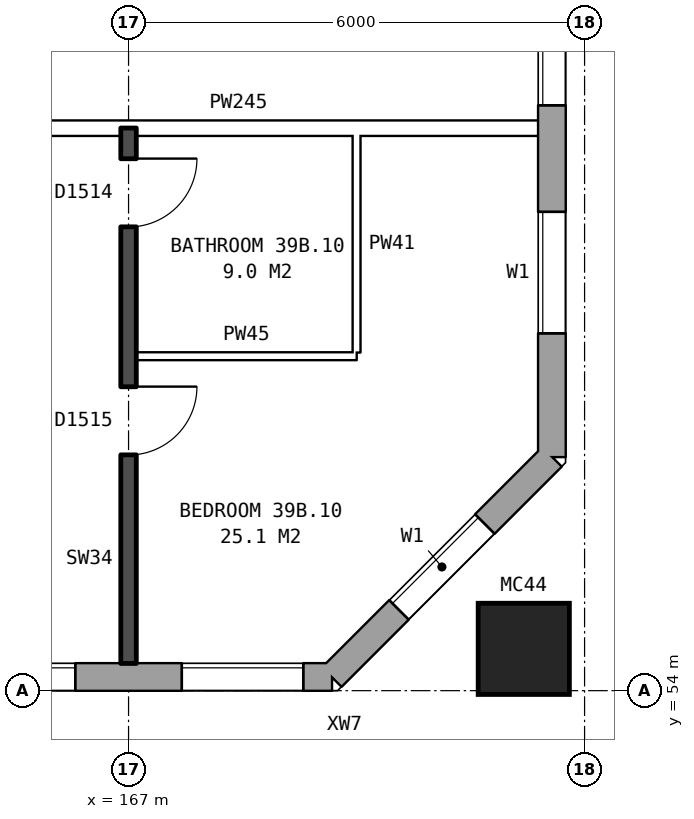
"""IFC4 building model, lengths in metres.
Left out: names, types, materials, properties, quantities, classifications, styles, units other than length and angle.
Written with IfcOpenShell. Run it as: python <this file> out.ifc"""

import sys

from ifc_helpers import new_model, si_unit, direction, frame, frame_2d, origin, origin_2d, place, context, subcontext, project, spatial, rectangle, hollow_rectangle, extrude, element, fill, save


model = new_model("IFC4")
c1 = context("Model", 3, precision=1e-05, world=origin(), true_north=direction((0.0, 1.0)))
c2 = subcontext(c1, "Body", "Model", "MODEL_VIEW")
j1 = project(units=[si_unit("LENGTHUNIT", "METRE"), si_unit("PLANEANGLEUNIT", "RADIAN")], contexts=[c1])
p1 = place(None, origin())
s1 = spatial("IfcSite", under=j1, at=p1, CompositionType="ELEMENT")
p2 = place(p1, origin())
s2 = spatial("IfcBuilding", under=s1, at=p2, CompositionType="ELEMENT")
p3 = place(p2, frame((0.0, 0.0, 139.2)))
s3 = spatial("IfcBuildingStorey", under=s2, at=p3, CompositionType="ELEMENT", Elevation=139.2)
p4 = place(p3, frame((172.2, 54.55, 0.0), z_axis=(0.0, 0.0, 1.0), x_axis=(1.0, 0.0, 0.0)))
e1 = element("IfcColumn", 1, at=p4, inside=s3, PredefinedType="COLUMN", context=c2, shape_type="SweptSolid", body=[
    extrude(hollow_rectangle(XDim=1.2, YDim=1.2, WallThickness=0.065, at=origin_2d()), origin(), (0.0, 0.0, 1.0), 3.1),
])
p5 = place(p3, frame((134.075, 54.18, 0.0), z_axis=(0.0, 0.0, 1.0), x_axis=(1.0, 0.0, 0.0)))
e2 = element("IfcWall", 2, at=p5, inside=s3, PredefinedType="STANDARD", context=c2, shape_type="SweptSolid", body=[
    extrude(rectangle(XDim=35.601, YDim=0.36, at=frame_2d((17.8, 0.0))), origin(), (0.0, 0.0, 1.0), 2.85),
])
p6 = place(p5, frame((0.625, 0.0, 0.8)))
e3 = element("IfcOpeningElement", 3, at=p6, cuts=e2, PredefinedType="OPENING", context=c2, shape_type="SweptSolid", body=[
    extrude(rectangle(XDim=1.6, YDim=1.8, at=frame_2d((0.8, 0.9))), frame((0.0, 0.19, 0.0), z_axis=(0.0, -1.0, 0.0), x_axis=(1.0, 0.0, 0.0)), (0.0, 0.0, 1.0), 0.38),
])
p7 = place(p5, frame((3.625, 0.0, 0.8)))
e4 = element("IfcOpeningElement", 4, at=p7, cuts=e2, PredefinedType="OPENING", context=c2, shape_type="SweptSolid", body=[
    extrude(rectangle(XDim=1.6, YDim=1.8, at=frame_2d((0.8, 0.9))), frame((0.0, 0.19, 0.0), z_axis=(0.0, -1.0, 0.0), x_axis=(1.0, 0.0, 0.0)), (0.0, 0.0, 1.0), 0.38),
])
p8 = place(p5, frame((6.625, 0.0, 0.8)))
e5 = element("IfcOpeningElement", 5, at=p8, cuts=e2, PredefinedType="OPENING", context=c2, shape_type="SweptSolid", body=[
    extrude(rectangle(XDim=1.6, YDim=1.8, at=frame_2d((0.8, 0.9))), frame((0.0, 0.19, 0.0), z_axis=(0.0, -1.0, 0.0), x_axis=(1.0, 0.0, 0.0)), (0.0, 0.0, 1.0), 0.38),
])
p9 = place(p5, frame((9.625, 0.0, 0.8)))
e6 = element("IfcOpeningElement", 6, at=p9, cuts=e2, PredefinedType="OPENING", context=c2, shape_type="SweptSolid", body=[
    extrude(rectangle(XDim=1.6, YDim=1.8, at=frame_2d((0.8, 0.9))), frame((0.0, 0.19, 0.0), z_axis=(0.0, -1.0, 0.0), x_axis=(1.0, 0.0, 0.0)), (0.0, 0.0, 1.0), 0.38),
])
p10 = place(p5, frame((12.625, 0.0, 0.8)))
e7 = element("IfcOpeningElement", 7, at=p10, cuts=e2, PredefinedType="OPENING", context=c2, shape_type="SweptSolid", body=[
    extrude(rectangle(XDim=1.6, YDim=1.8, at=frame_2d((0.8, 0.9))), frame((0.0, 0.19, 0.0), z_axis=(0.0, -1.0, 0.0), x_axis=(1.0, 0.0, 0.0)), (0.0, 0.0, 1.0), 0.38),
])
p11 = place(p5, frame((15.125, 0.0, 1.25)))
e8 = element("IfcOpeningElement", 8, at=p11, cuts=e2, PredefinedType="OPENING", context=c2, shape_type="SweptSolid", body=[
    extrude(rectangle(XDim=0.8, YDim=1.2, at=frame_2d((0.4, 0.6))), frame((0.0, 0.19, 0.0), z_axis=(0.0, -1.0, 0.0), x_axis=(1.0, 0.0, 0.0)), (0.0, 0.0, 1.0), 0.38),
])
p12 = place(p5, frame((18.075, 0.0, 0.25)))
e9 = element("IfcOpeningElement", 9, at=p12, cuts=e2, PredefinedType="OPENING", context=c2, shape_type="SweptSolid", body=[
    extrude(rectangle(XDim=0.6, YDim=0.9, at=frame_2d((0.3, 0.45))), frame((0.0, 0.19, 0.0), z_axis=(0.0, -1.0, 0.0), x_axis=(1.0, 0.0, 0.0)), (0.0, 0.0, 1.0), 0.38),
])
p13 = place(p5, frame((21.625, 0.0, 0.8)))
e10 = element("IfcOpeningElement", 10, at=p13, cuts=e2, PredefinedType="OPENING", context=c2, shape_type="SweptSolid", body=[
    extrude(rectangle(XDim=1.6, YDim=1.8, at=frame_2d((0.8, 0.9))), frame((0.0, 0.19, 0.0), z_axis=(0.0, -1.0, 0.0), x_axis=(1.0, 0.0, 0.0)), (0.0, 0.0, 1.0), 0.38),
])
p14 = place(p5, frame((24.625, 0.0, 0.8)))
e11 = element("IfcOpeningElement", 11, at=p14, cuts=e2, PredefinedType="OPENING", context=c2, shape_type="SweptSolid", body=[
    extrude(rectangle(XDim=1.6, YDim=1.8, at=frame_2d((0.8, 0.9))), frame((0.0, 0.19, 0.0), z_axis=(0.0, -1.0, 0.0), x_axis=(1.0, 0.0, 0.0)), (0.0, 0.0, 1.0), 0.38),
])
p15 = place(p5, frame((27.625, 0.0, 0.8)))
e12 = element("IfcOpeningElement", 12, at=p15, cuts=e2, PredefinedType="OPENING", context=c2, shape_type="SweptSolid", body=[
    extrude(rectangle(XDim=1.6, YDim=1.8, at=frame_2d((0.8, 0.9))), frame((0.0, 0.19, 0.0), z_axis=(0.0, -1.0, 0.0), x_axis=(1.0, 0.0, 0.0)), (0.0, 0.0, 1.0), 0.38),
])
p16 = place(p5, frame((30.625, 0.0, 0.8)))
e13 = element("IfcOpeningElement", 13, at=p16, cuts=e2, PredefinedType="OPENING", context=c2, shape_type="SweptSolid", body=[
    extrude(rectangle(XDim=1.6, YDim=1.8, at=frame_2d((0.8, 0.9))), frame((0.0, 0.19, 0.0), z_axis=(0.0, -1.0, 0.0), x_axis=(1.0, 0.0, 0.0)), (0.0, 0.0, 1.0), 0.38),
])
p17 = place(p5, frame((33.625, 0.0, 0.8)))
e14 = element("IfcOpeningElement", 14, at=p17, cuts=e2, PredefinedType="OPENING", context=c2, shape_type="SweptSolid", body=[
    extrude(rectangle(XDim=1.6, YDim=1.8, at=frame_2d((0.8, 0.9))), frame((0.0, 0.19, 0.0), z_axis=(0.0, -1.0, 0.0), x_axis=(1.0, 0.0, 0.0)), (0.0, 0.0, 1.0), 0.38),
])
p18 = place(p5, frame((16.825, 0.0, 0.15)))
e15 = element("IfcOpeningElement", 15, at=p18, cuts=e2, PredefinedType="OPENING", context=c2, shape_type="SweptSolid", body=[
    extrude(rectangle(XDim=0.8, YDim=0.9, at=frame_2d((0.4, 0.45))), frame((0.0, 0.19, 0.0), z_axis=(0.0, -1.0, 0.0), x_axis=(1.0, 0.0, 0.0)), (0.0, 0.0, 1.0), 0.38),
])
p19 = place(p5, frame((19.325, 0.0, 1.65)))
e16 = element("IfcOpeningElement", 16, at=p19, cuts=e2, PredefinedType="OPENING", context=c2, shape_type="SweptSolid", body=[
    extrude(rectangle(XDim=1.4, YDim=0.9, at=frame_2d((0.7, 0.45))), frame((0.0, 0.19, 0.0), z_axis=(0.0, -1.0, 0.0), x_axis=(1.0, 0.0, 0.0)), (0.0, 0.0, 1.0), 0.38),
])
p20 = place(p3, frame((169.675, 54.18, 0.0), z_axis=(0.0, 0.0, 1.0), x_axis=(0.707106781187, 0.707106781187, 0.0)))
e17 = element("IfcWall", 17, at=p20, inside=s3, PredefinedType="STANDARD", context=c2, shape_type="SweptSolid", body=[
    extrude(rectangle(XDim=4.094, YDim=0.36, at=frame_2d((2.047, 0.0))), origin(), (0.0, 0.0, 1.0), 2.85),
])
p21 = place(p20, frame((1.247, 0.0, 0.8)))
e18 = element("IfcOpeningElement", 18, at=p21, cuts=e17, PredefinedType="OPENING", context=c2, shape_type="SweptSolid", body=[
    extrude(rectangle(XDim=1.6, YDim=1.8, at=frame_2d((0.8, 0.9))), frame((0.0, 0.19, 0.0), z_axis=(0.0, -1.0, 0.0), x_axis=(1.0, 0.0, 0.0)), (0.0, 0.0, 1.0), 0.38),
])
p22 = place(p3, frame((172.57, 57.075, 0.0), z_axis=(0.0, 0.0, 1.0), x_axis=(0.0, 1.0, 0.0)))
e19 = element("IfcWall", 19, at=p22, inside=s3, PredefinedType="STANDARD", context=c2, shape_type="SweptSolid", body=[
    extrude(rectangle(XDim=25.851, YDim=0.36, at=frame_2d((12.925, 0.0))), origin(), (0.0, 0.0, 1.0), 2.85),
])
p23 = place(p22, frame((1.625, 0.0, 0.8)))
e20 = element("IfcOpeningElement", 20, at=p23, cuts=e19, PredefinedType="OPENING", context=c2, shape_type="SweptSolid", body=[
    extrude(rectangle(XDim=1.6, YDim=1.8, at=frame_2d((0.8, 0.9))), frame((0.0, 0.19, 0.0), z_axis=(0.0, -1.0, 0.0), x_axis=(1.0, 0.0, 0.0)), (0.0, 0.0, 1.0), 0.38),
])
p24 = place(p22, frame((4.625, 0.0, 0.8)))
e21 = element("IfcOpeningElement", 21, at=p24, cuts=e19, PredefinedType="OPENING", context=c2, shape_type="SweptSolid", body=[
    extrude(rectangle(XDim=1.6, YDim=1.8, at=frame_2d((0.8, 0.9))), frame((0.0, 0.19, 0.0), z_axis=(0.0, -1.0, 0.0), x_axis=(1.0, 0.0, 0.0)), (0.0, 0.0, 1.0), 0.38),
])
p25 = place(p22, frame((7.625, 0.0, 0.8)))
e22 = element("IfcOpeningElement", 22, at=p25, cuts=e19, PredefinedType="OPENING", context=c2, shape_type="SweptSolid", body=[
    extrude(rectangle(XDim=1.6, YDim=1.8, at=frame_2d((0.8, 0.9))), frame((0.0, 0.19, 0.0), z_axis=(0.0, -1.0, 0.0), x_axis=(1.0, 0.0, 0.0)), (0.0, 0.0, 1.0), 0.38),
])
p26 = place(p22, frame((10.625, 0.0, 0.8)))
e23 = element("IfcOpeningElement", 23, at=p26, cuts=e19, PredefinedType="OPENING", context=c2, shape_type="SweptSolid", body=[
    extrude(rectangle(XDim=1.6, YDim=1.8, at=frame_2d((0.8, 0.9))), frame((0.0, 0.19, 0.0), z_axis=(0.0, -1.0, 0.0), x_axis=(1.0, 0.0, 0.0)), (0.0, 0.0, 1.0), 0.38),
])
p27 = place(p22, frame((13.625, 0.0, 0.8)))
e24 = element("IfcOpeningElement", 24, at=p27, cuts=e19, PredefinedType="OPENING", context=c2, shape_type="SweptSolid", body=[
    extrude(rectangle(XDim=1.6, YDim=1.8, at=frame_2d((0.8, 0.9))), frame((0.0, 0.19, 0.0), z_axis=(0.0, -1.0, 0.0), x_axis=(1.0, 0.0, 0.0)), (0.0, 0.0, 1.0), 0.38),
])
p28 = place(p22, frame((16.625, 0.0, 0.8)))
e25 = element("IfcOpeningElement", 25, at=p28, cuts=e19, PredefinedType="OPENING", context=c2, shape_type="SweptSolid", body=[
    extrude(rectangle(XDim=1.6, YDim=1.8, at=frame_2d((0.8, 0.9))), frame((0.0, 0.19, 0.0), z_axis=(0.0, -1.0, 0.0), x_axis=(1.0, 0.0, 0.0)), (0.0, 0.0, 1.0), 0.38),
])
p29 = place(p22, frame((19.625, 0.0, 0.8)))
e26 = element("IfcOpeningElement", 26, at=p29, cuts=e19, PredefinedType="OPENING", context=c2, shape_type="SweptSolid", body=[
    extrude(rectangle(XDim=1.6, YDim=1.8, at=frame_2d((0.8, 0.9))), frame((0.0, 0.19, 0.0), z_axis=(0.0, -1.0, 0.0), x_axis=(1.0, 0.0, 0.0)), (0.0, 0.0, 1.0), 0.38),
])
p30 = place(p22, frame((22.625, 0.0, 0.8)))
e27 = element("IfcOpeningElement", 27, at=p30, cuts=e19, PredefinedType="OPENING", context=c2, shape_type="SweptSolid", body=[
    extrude(rectangle(XDim=1.6, YDim=1.8, at=frame_2d((0.8, 0.9))), frame((0.0, 0.19, 0.0), z_axis=(0.0, -1.0, 0.0), x_axis=(1.0, 0.0, 0.0)), (0.0, 0.0, 1.0), 0.38),
])
p31 = place(p3, frame((167.1, 58.4, 0.0), z_axis=(0.0, 0.0, 1.0), x_axis=(1.0, 0.0, 0.0)))
e28 = element("IfcWall", 28, at=p31, inside=s3, PredefinedType="PARTITIONING", context=c2, shape_type="SweptSolid", body=[
    extrude(rectangle(XDim=2.9, YDim=0.1, at=frame_2d((1.45, 0.0))), origin(), (0.0, 0.0, 1.0), 2.85),
])
p32 = place(p3, frame((155.1, 61.4, 0.0), z_axis=(0.0, 0.0, 1.0), x_axis=(1.0, 0.0, 0.0)))
e29 = element("IfcWall", 29, at=p32, inside=s3, PredefinedType="PARTITIONING", context=c2, shape_type="SweptSolid", body=[
    extrude(rectangle(XDim=17.29, YDim=0.2, at=frame_2d((8.645, 0.0))), origin(), (0.0, 0.0, 1.0), 2.85),
])
p33 = place(p32, frame((3.6, 0.0, 0.0)))
e30 = element("IfcOpeningElement", 30, at=p33, cuts=e29, PredefinedType="OPENING", context=c2, shape_type="SweptSolid", body=[
    extrude(rectangle(XDim=1.0, YDim=2.1, at=frame_2d((0.5, 1.05))), frame((0.0, 0.11, 0.0), z_axis=(0.0, -1.0, 0.0), x_axis=(1.0, 0.0, 0.0)), (0.0, 0.0, 1.0), 0.22),
])
p34 = place(p32, frame((8.4, 0.0, 0.0)))
e31 = element("IfcOpeningElement", 31, at=p34, cuts=e29, PredefinedType="OPENING", context=c2, shape_type="SweptSolid", body=[
    extrude(rectangle(XDim=1.0, YDim=2.1, at=frame_2d((0.5, 1.05))), frame((0.0, 0.11, 0.0), z_axis=(0.0, -1.0, 0.0), x_axis=(1.0, 0.0, 0.0)), (0.0, 0.0, 1.0), 0.22),
])
p35 = place(p3, frame((167.0, 54.36, 0.0), z_axis=(0.0, 0.0, 1.0), x_axis=(0.0, 1.0, 0.0)))
e32 = element("IfcWall", 32, at=p35, inside=s3, PredefinedType="SOLIDWALL", context=c2, shape_type="SweptSolid", body=[
    extrude(rectangle(XDim=7.04, YDim=0.2, at=frame_2d((3.52, 0.0))), origin(), (0.0, 0.0, 1.0), 2.85),
])
p36 = place(p35, frame((2.74, 0.0, 0.0)))
e33 = element("IfcOpeningElement", 33, at=p36, cuts=e32, PredefinedType="OPENING", context=c2, shape_type="SweptSolid", body=[
    extrude(rectangle(XDim=0.9, YDim=2.1, at=frame_2d((0.45, 1.05))), frame((0.0, 0.11, 0.0), z_axis=(0.0, -1.0, 0.0), x_axis=(1.0, 0.0, 0.0)), (0.0, 0.0, 1.0), 0.22),
])
p37 = place(p35, frame((5.74, 0.0, 0.0)))
e34 = element("IfcOpeningElement", 34, at=p37, cuts=e32, PredefinedType="OPENING", context=c2, shape_type="SweptSolid", body=[
    extrude(rectangle(XDim=0.9, YDim=2.1, at=frame_2d((0.45, 1.05))), frame((0.0, 0.11, 0.0), z_axis=(0.0, -1.0, 0.0), x_axis=(1.0, 0.0, 0.0)), (0.0, 0.0, 1.0), 0.22),
])
p38 = place(p3, frame((170.0, 58.45, 0.0), z_axis=(0.0, 0.0, 1.0), x_axis=(0.0, 1.0, 0.0)))
e35 = element("IfcWall", 35, at=p38, inside=s3, PredefinedType="PARTITIONING", context=c2, shape_type="SweptSolid", body=[
    extrude(rectangle(XDim=2.85, YDim=0.1, at=frame_2d((1.425, 0.0))), origin(), (0.0, 0.0, 1.0), 2.85),
])
p39 = place(p16, origin())
e36 = element("IfcWindow", 36, at=p39, inside=s3, PartitioningType="SINGLE_PANEL", PredefinedType="WINDOW", context=c2, shape_type="SweptSolid", body=[
    extrude(rectangle(XDim=1.6, YDim=1.8, at=frame_2d((0.8, 0.9))), frame((0.0, 0.15, 0.0), z_axis=(0.0, -1.0, 0.0), x_axis=(1.0, 0.0, 0.0)), (0.0, 0.0, 1.0), 0.06),
])
fill(e13, e36)
p40 = place(p17, origin())
e37 = element("IfcWindow", 37, at=p40, inside=s3, PartitioningType="SINGLE_PANEL", PredefinedType="WINDOW", context=c2, shape_type="SweptSolid", body=[
    extrude(rectangle(XDim=1.6, YDim=1.8, at=frame_2d((0.8, 0.9))), frame((0.0, 0.15, 0.0), z_axis=(0.0, -1.0, 0.0), x_axis=(1.0, 0.0, 0.0)), (0.0, 0.0, 1.0), 0.06),
])
fill(e14, e37)
p41 = place(p21, origin())
e38 = element("IfcWindow", 38, at=p41, inside=s3, PartitioningType="SINGLE_PANEL", PredefinedType="WINDOW", context=c2, shape_type="SweptSolid", body=[
    extrude(rectangle(XDim=1.6, YDim=1.8, at=frame_2d((0.8, 0.9))), frame((0.0, 0.15, 0.0), z_axis=(0.0, -1.0, 0.0), x_axis=(1.0, 0.0, 0.0)), (0.0, 0.0, 1.0), 0.06),
])
fill(e18, e38)
p42 = place(p23, origin())
e39 = element("IfcWindow", 39, at=p42, inside=s3, PartitioningType="SINGLE_PANEL", PredefinedType="WINDOW", context=c2, shape_type="SweptSolid", body=[
    extrude(rectangle(XDim=1.6, YDim=1.8, at=frame_2d((0.8, 0.9))), frame((0.0, 0.15, 0.0), z_axis=(0.0, -1.0, 0.0), x_axis=(1.0, 0.0, 0.0)), (0.0, 0.0, 1.0), 0.06),
])
fill(e20, e39)
p43 = place(p24, origin())
e40 = element("IfcWindow", 40, at=p43, inside=s3, PartitioningType="SINGLE_PANEL", PredefinedType="WINDOW", context=c2, shape_type="SweptSolid", body=[
    extrude(rectangle(XDim=1.6, YDim=1.8, at=frame_2d((0.8, 0.9))), frame((0.0, 0.15, 0.0), z_axis=(0.0, -1.0, 0.0), x_axis=(1.0, 0.0, 0.0)), (0.0, 0.0, 1.0), 0.06),
])
fill(e21, e40)
p44 = place(p36, frame((0.9, 0.0, 0.0), z_axis=(0.0, 0.0, 1.0), x_axis=(-1.0, 0.0, 0.0)))
e41 = element("IfcDoor", 41, at=p44, inside=s3, OperationType="SINGLE_SWING_LEFT", PredefinedType="DOOR", context=c2, shape_type="SweptSolid", body=[
    extrude(rectangle(XDim=0.9, YDim=2.1, at=frame_2d((0.45, 1.05))), frame((0.0, 0.025, 0.0), z_axis=(0.0, -1.0, 0.0), x_axis=(1.0, 0.0, 0.0)), (0.0, 0.0, 1.0), 0.05),
])
fill(e33, e41)
p45 = place(p37, frame((0.9, 0.0, 0.0), z_axis=(0.0, 0.0, 1.0), x_axis=(-1.0, 0.0, 0.0)))
e42 = element("IfcDoor", 42, at=p45, inside=s3, OperationType="SINGLE_SWING_LEFT", PredefinedType="DOOR", context=c2, shape_type="SweptSolid", body=[
    extrude(rectangle(XDim=0.9, YDim=2.1, at=frame_2d((0.45, 1.05))), frame((0.0, 0.025, 0.0), z_axis=(0.0, -1.0, 0.0), x_axis=(1.0, 0.0, 0.0)), (0.0, 0.0, 1.0), 0.05),
])
fill(e34, e42)
save(model, sys.argv[1])
